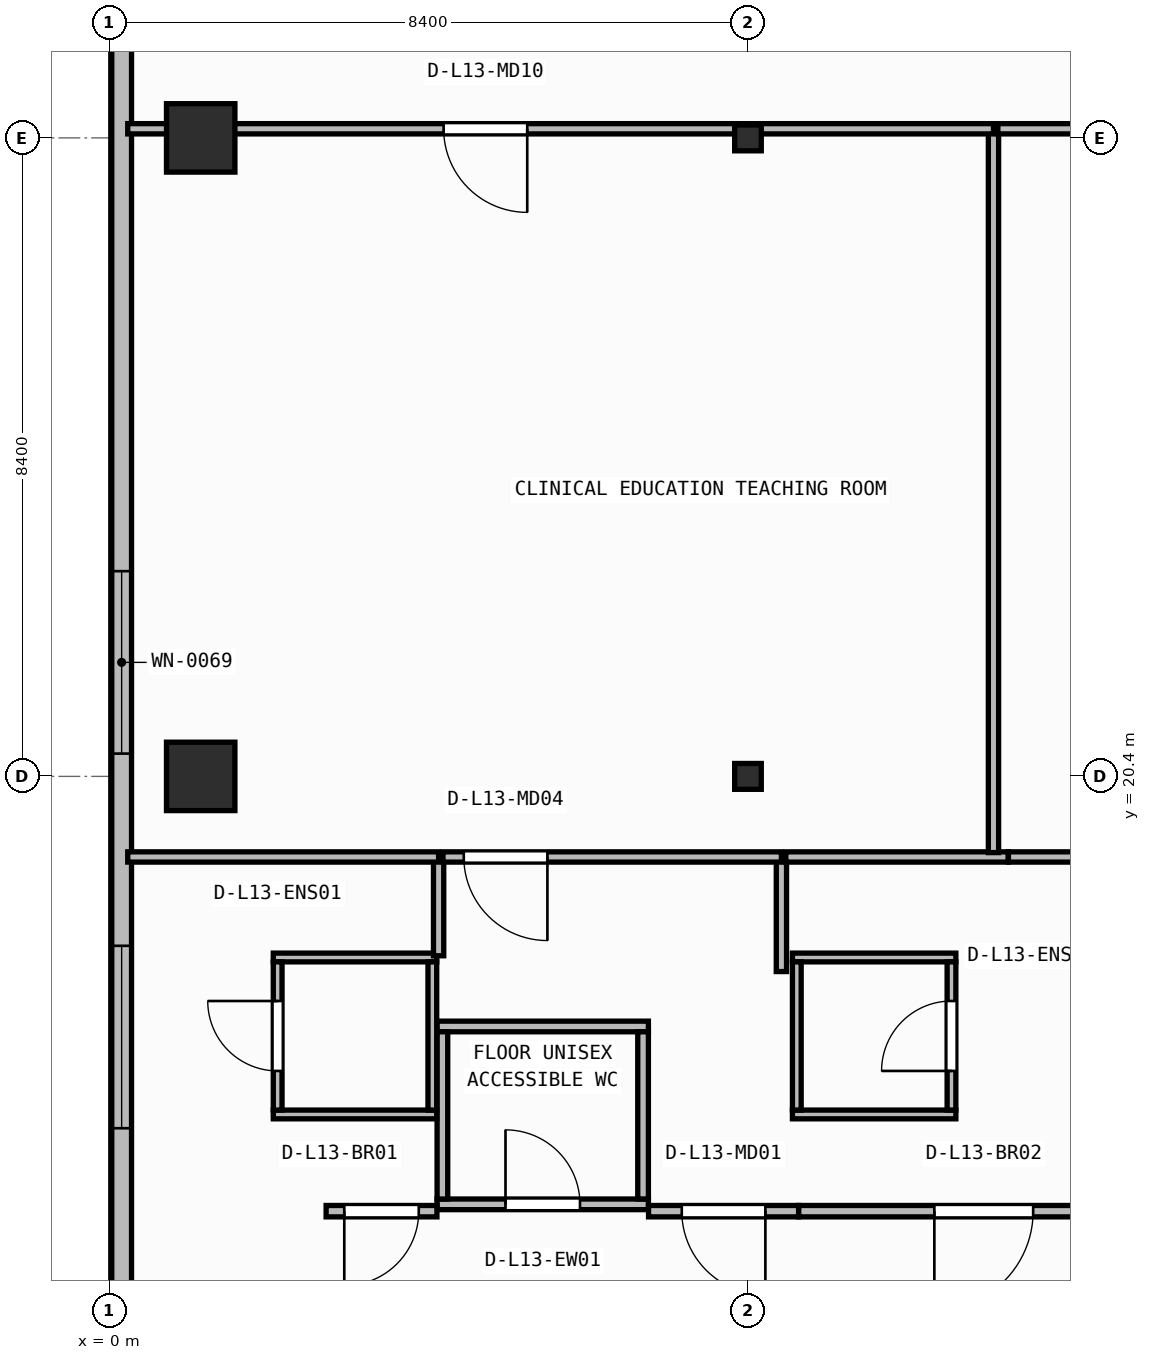
"""IFC4 building model, lengths in metres.
Left out: names, types, materials, properties, quantities, classifications, styles, units other than length and angle.
Written with IfcOpenShell. Run it as: python <this file> out.ifc"""

import sys

from ifc_helpers import new_model, si_unit, direction, frame, frame_2d, origin, origin_2d, place, context, subcontext, project, spatial, rectangle, i_section, extrude, element, fill, save


model = new_model("IFC4")
c1 = context("Model", 3, precision=1e-05, world=origin(), true_north=direction((0.0, 1.0)))
c2 = subcontext(c1, "Body", "Model", "MODEL_VIEW")
j1 = project(units=[si_unit("LENGTHUNIT", "METRE"), si_unit("PLANEANGLEUNIT", "RADIAN")], contexts=[c1])
p1 = place(None, origin())
s1 = spatial("IfcSite", under=j1, at=p1, CompositionType="ELEMENT")
p2 = place(p1, origin())
s2 = spatial("IfcBuilding", under=s1, at=p2, CompositionType="ELEMENT")
p3 = place(p2, frame((0.0, 0.0, 54.1)))
s3 = spatial("IfcBuildingStorey", under=s2, at=p3, CompositionType="ELEMENT", Elevation=54.1)
p4 = place(p3, frame((1.2, 20.4, 0.0), z_axis=(0.0, 0.0, 1.0), x_axis=(1.0, 0.0, 0.0)))
e1 = element("IfcColumn", 1, at=p4, inside=s3, PredefinedType="COLUMN", context=c2, shape_type="SweptSolid", body=[
    extrude(rectangle(XDim=0.9, YDim=0.9, at=origin_2d()), origin(), (0.0, 0.0, 1.0), 3.95),
])
p5 = place(p3, frame((8.4, 20.4, 0.0), z_axis=(0.0, 0.0, 1.0), x_axis=(1.0, 0.0, 0.0)))
e2 = element("IfcColumn", 2, at=p5, inside=s3, PredefinedType="COLUMN", context=c2, shape_type="SweptSolid", body=[
    extrude(i_section(OverallWidth=0.35, OverallDepth=0.34, WebThickness=0.016, FlangeThickness=0.028, at=origin_2d()), origin(), (0.0, 0.0, 1.0), 3.95),
])
p6 = place(p3, frame((1.2, 28.8, 0.0), z_axis=(0.0, 0.0, 1.0), x_axis=(1.0, 0.0, 0.0)))
e3 = element("IfcColumn", 3, at=p6, inside=s3, PredefinedType="COLUMN", context=c2, shape_type="SweptSolid", body=[
    extrude(rectangle(XDim=0.9, YDim=0.9, at=origin_2d()), origin(), (0.0, 0.0, 1.0), 3.95),
])
p7 = place(p3, frame((8.4, 28.8, 0.0), z_axis=(0.0, 0.0, 1.0), x_axis=(1.0, 0.0, 0.0)))
e4 = element("IfcColumn", 4, at=p7, inside=s3, PredefinedType="COLUMN", context=c2, shape_type="SweptSolid", body=[
    extrude(i_section(OverallWidth=0.35, OverallDepth=0.34, WebThickness=0.016, FlangeThickness=0.028, at=origin_2d()), origin(), (0.0, 0.0, 1.0), 3.95),
])
p8 = place(p3, frame((0.16, 41.04, 0.0), z_axis=(0.0, 0.0, 1.0), x_axis=(0.0, -1.0, 0.0)))
e5 = element("IfcWall", 5, at=p8, inside=s3, PredefinedType="STANDARD", context=c2, shape_type="SweptSolid", body=[
    extrude(rectangle(XDim=38.28, YDim=0.26, at=frame_2d((19.14, 0.0))), origin(), (0.0, 0.0, 1.0), 3.71),
])
p9 = place(p8, frame((17.94, 0.0, 0.9)))
e6 = element("IfcOpeningElement", 6, at=p9, cuts=e5, PredefinedType="OPENING", context=c2, shape_type="SweptSolid", body=[
    extrude(rectangle(XDim=2.4, YDim=1.65, at=frame_2d((1.2, 0.825))), frame((0.0, 0.14, 0.0), z_axis=(0.0, -1.0, 0.0), x_axis=(1.0, 0.0, 0.0)), (0.0, 0.0, 1.0), 0.28),
])
p10 = place(p8, frame((22.869, 0.0, 0.9)))
e7 = element("IfcOpeningElement", 7, at=p10, cuts=e5, PredefinedType="OPENING", context=c2, shape_type="SweptSolid", body=[
    extrude(rectangle(XDim=2.4, YDim=1.65, at=frame_2d((1.2, 0.825))), frame((0.0, 0.14, 0.0), z_axis=(0.0, -1.0, 0.0), x_axis=(1.0, 0.0, 0.0)), (0.0, 0.0, 1.0), 0.28),
])
p11 = place(p3, frame((4.31, 14.77, 0.0), z_axis=(0.0, 0.0, 1.0), x_axis=(1.0, 0.0, 0.0)))
e8 = element("IfcWall", 8, at=p11, inside=s3, PredefinedType="PARTITIONING", context=c2, shape_type="SweptSolid", body=[
    extrude(rectangle(XDim=2.78, YDim=0.14, at=frame_2d((1.39, 0.0))), origin(), (0.0, 0.0, 1.0), 3.71),
])
p12 = place(p11, frame((0.9, 0.0, 0.0)))
e9 = element("IfcOpeningElement", 9, at=p12, cuts=e8, PredefinedType="OPENING", context=c2, shape_type="SweptSolid", body=[
    extrude(rectangle(XDim=0.98, YDim=2.1, at=frame_2d((0.49, 1.05))), frame((0.0, 0.08, 0.0), z_axis=(0.0, -1.0, 0.0), x_axis=(1.0, 0.0, 0.0)), (0.0, 0.0, 1.0), 0.16),
])
p13 = place(p3, frame((4.31, 17.11, 0.0), z_axis=(0.0, 0.0, 1.0), x_axis=(1.0, 0.0, 0.0)))
e10 = element("IfcWall", 10, at=p13, inside=s3, PredefinedType="PARTITIONING", context=c2, shape_type="SweptSolid", body=[
    extrude(rectangle(XDim=2.78, YDim=0.14, at=frame_2d((1.39, 0.0))), origin(), (0.0, 0.0, 1.0), 3.71),
])
for number, where, z_axis, x_axis in (
    (11, (4.38, 14.84, 0.0), (0.0, 0.0, 1.0), (0.0, 1.0, 0.0)),
    (12, (7.02, 14.84, 0.0), (0.0, 0.0, 1.0), (0.0, 1.0, 0.0)),
):
    element("IfcWall", number, at=place(p3, frame(where, z_axis=z_axis, x_axis=x_axis)), inside=s3, PredefinedType="PARTITIONING", context=c2, shape_type="SweptSolid", body=[
        extrude(rectangle(XDim=2.2, YDim=0.14, at=frame_2d((1.1, 0.0))), origin(), (0.0, 0.0, 1.0), 3.71),
    ])
for number, where, z_axis, x_axis in (
    (13, (2.155, 15.952, 0.0), (0.0, 0.0, 1.0), (1.0, 0.0, 0.0)),
    (14, (2.155, 18.018, 0.0), (0.0, 0.0, 1.0), (1.0, 0.0, 0.0)),
):
    element("IfcWall", number, at=place(p3, frame(where, z_axis=z_axis, x_axis=x_axis)), inside=s3, PredefinedType="PARTITIONING", context=c2, shape_type="SweptSolid", body=[
        extrude(rectangle(XDim=2.15, YDim=0.115, at=frame_2d((1.075, 0.0))), origin(), (0.0, 0.0, 1.0), 3.71),
    ])
p14 = place(p3, frame((2.212, 16.01, 0.0), z_axis=(0.0, 0.0, 1.0), x_axis=(0.0, 1.0, 0.0)))
e15 = element("IfcWall", 15, at=p14, inside=s3, PredefinedType="PARTITIONING", context=c2, shape_type="SweptSolid", body=[
    extrude(rectangle(XDim=1.95, YDim=0.115, at=frame_2d((0.975, 0.0))), origin(), (0.0, 0.0, 1.0), 3.71),
])
p15 = place(p14, frame((0.515, 0.0, 0.0)))
e16 = element("IfcOpeningElement", 16, at=p15, cuts=e15, PredefinedType="OPENING", context=c2, shape_type="SweptSolid", body=[
    extrude(rectangle(XDim=0.92, YDim=2.1, at=frame_2d((0.46, 1.05))), frame((0.0, 0.067, 0.0), z_axis=(0.0, -1.0, 0.0), x_axis=(1.0, 0.0, 0.0)), (0.0, 0.0, 1.0), 0.135),
])
p16 = place(p3, frame((4.248, 16.01, 0.0), z_axis=(0.0, 0.0, 1.0), x_axis=(0.0, 1.0, 0.0)))
e17 = element("IfcWall", 17, at=p16, inside=s3, PredefinedType="PARTITIONING", context=c2, shape_type="SweptSolid", body=[
    extrude(rectangle(XDim=1.95, YDim=0.115, at=frame_2d((0.975, 0.0))), origin(), (0.0, 0.0, 1.0), 3.71),
])
for number, where, z_axis, x_axis in (
    (18, (8.985, 15.952, 0.0), (0.0, 0.0, 1.0), (1.0, 0.0, 0.0)),
    (19, (8.985, 18.018, 0.0), (0.0, 0.0, 1.0), (1.0, 0.0, 0.0)),
):
    element("IfcWall", number, at=place(p3, frame(where, z_axis=z_axis, x_axis=x_axis)), inside=s3, PredefinedType="PARTITIONING", context=c2, shape_type="SweptSolid", body=[
        extrude(rectangle(XDim=2.15, YDim=0.115, at=frame_2d((1.075, 0.0))), origin(), (0.0, 0.0, 1.0), 3.71),
    ])
p17 = place(p3, frame((9.042, 16.01, 0.0), z_axis=(0.0, 0.0, 1.0), x_axis=(0.0, 1.0, 0.0)))
e20 = element("IfcWall", 20, at=p17, inside=s3, PredefinedType="PARTITIONING", context=c2, shape_type="SweptSolid", body=[
    extrude(rectangle(XDim=1.95, YDim=0.115, at=frame_2d((0.975, 0.0))), origin(), (0.0, 0.0, 1.0), 3.71),
])
p18 = place(p3, frame((11.077, 16.01, 0.0), z_axis=(0.0, 0.0, 1.0), x_axis=(0.0, 1.0, 0.0)))
e21 = element("IfcWall", 21, at=p18, inside=s3, PredefinedType="PARTITIONING", context=c2, shape_type="SweptSolid", body=[
    extrude(rectangle(XDim=1.95, YDim=0.115, at=frame_2d((0.975, 0.0))), origin(), (0.0, 0.0, 1.0), 3.71),
])
p19 = place(p18, frame((0.515, 0.0, 0.0)))
e22 = element("IfcOpeningElement", 22, at=p19, cuts=e21, PredefinedType="OPENING", context=c2, shape_type="SweptSolid", body=[
    extrude(rectangle(XDim=0.92, YDim=2.1, at=frame_2d((0.46, 1.05))), frame((0.0, 0.067, 0.0), z_axis=(0.0, -1.0, 0.0), x_axis=(1.0, 0.0, 0.0)), (0.0, 0.0, 1.0), 0.135),
])
p20 = place(p3, frame((4.308, 14.68, 0.0), z_axis=(0.0, 0.0, 1.0), x_axis=(-1.0, 0.0, 0.0)))
e23 = element("IfcWall", 23, at=p20, inside=s3, PredefinedType="PARTITIONING", context=c2, shape_type="SweptSolid", body=[
    extrude(rectangle(XDim=1.458, YDim=0.15, at=frame_2d((0.729, 0.0))), origin(), (0.0, 0.0, 1.0), 3.71),
])
p21 = place(p20, frame((0.239, 0.0, 0.0)))
e24 = element("IfcOpeningElement", 24, at=p21, cuts=e23, PredefinedType="OPENING", context=c2, shape_type="SweptSolid", body=[
    extrude(rectangle(XDim=0.98, YDim=2.1, at=frame_2d((0.49, 1.05))), frame((0.0, 0.085, 0.0), z_axis=(0.0, -1.0, 0.0), x_axis=(1.0, 0.0, 0.0)), (0.0, 0.0, 1.0), 0.17),
])
p22 = place(p3, frame((9.066, 14.68, 0.0), z_axis=(0.0, 0.0, 1.0), x_axis=(-1.0, 0.0, 0.0)))
e25 = element("IfcWall", 25, at=p22, inside=s3, PredefinedType="PARTITIONING", context=c2, shape_type="SweptSolid", body=[
    extrude(rectangle(XDim=1.974, YDim=0.15, at=frame_2d((0.987, 0.0))), origin(), (0.0, 0.0, 1.0), 3.71),
])
p23 = place(p22, frame((0.437, 0.0, 0.0)))
e26 = element("IfcOpeningElement", 26, at=p23, cuts=e25, PredefinedType="OPENING", context=c2, shape_type="SweptSolid", body=[
    extrude(rectangle(XDim=1.1, YDim=2.1, at=frame_2d((0.55, 1.05))), frame((0.0, 0.085, 0.0), z_axis=(0.0, -1.0, 0.0), x_axis=(1.0, 0.0, 0.0)), (0.0, 0.0, 1.0), 0.17),
])
p24 = place(p3, frame((13.936, 14.68, 0.0), z_axis=(0.0, 0.0, 1.0), x_axis=(-1.0, 0.0, 0.0)))
e27 = element("IfcWall", 27, at=p24, inside=s3, PredefinedType="PARTITIONING", context=c2, shape_type="SweptSolid", body=[
    extrude(rectangle(XDim=4.868, YDim=0.15, at=frame_2d((2.434, 0.0))), origin(), (0.0, 0.0, 1.0), 3.71),
])
p25 = place(p24, frame((1.784, 0.0, 0.0)))
e28 = element("IfcOpeningElement", 28, at=p25, cuts=e27, PredefinedType="OPENING", context=c2, shape_type="SweptSolid", body=[
    extrude(rectangle(XDim=1.3, YDim=2.15, at=frame_2d((0.65, 1.075))), frame((0.0, 0.085, 0.0), z_axis=(0.0, -1.0, 0.0), x_axis=(1.0, 0.0, 0.0)), (0.0, 0.0, 1.0), 0.17),
])
p26 = place(p3, frame((4.33, 18.04, 0.0), z_axis=(0.0, 0.0, 1.0), x_axis=(0.0, 1.0, 0.0)))
e29 = element("IfcWall", 29, at=p26, inside=s3, PredefinedType="PARTITIONING", context=c2, shape_type="SweptSolid", body=[
    extrude(rectangle(XDim=1.3, YDim=0.135, at=frame_2d((0.65, 0.0))), origin(), (0.0, 0.0, 1.0), 3.71),
])
p27 = place(p3, frame((4.33, 19.34, 0.0), z_axis=(0.0, 0.0, 1.0), x_axis=(-1.0, 0.0, 0.0)))
e30 = element("IfcWall", 30, at=p27, inside=s3, PredefinedType="PARTITIONING", context=c2, shape_type="SweptSolid", body=[
    extrude(rectangle(XDim=4.09, YDim=0.135, at=frame_2d((2.045, 0.0))), origin(), (0.0, 0.0, 1.0), 3.71),
])
p28 = place(p3, frame((8.84, 17.833, 0.0), z_axis=(0.0, 0.0, 1.0), x_axis=(0.0, 1.0, 0.0)))
e31 = element("IfcWall", 31, at=p28, inside=s3, PredefinedType="PARTITIONING", context=c2, shape_type="SweptSolid", body=[
    extrude(rectangle(XDim=1.508, YDim=0.135, at=frame_2d((0.754, 0.0))), origin(), (0.0, 0.0, 1.0), 3.71),
])
p29 = place(p3, frame((8.84, 19.34, 0.0), z_axis=(0.0, 0.0, 1.0), x_axis=(-1.0, 0.0, 0.0)))
e32 = element("IfcWall", 32, at=p29, inside=s3, PredefinedType="PARTITIONING", context=c2, shape_type="SweptSolid", body=[
    extrude(rectangle(XDim=4.453, YDim=0.135, at=frame_2d((2.226, 0.0))), origin(), (0.0, 0.0, 1.0), 3.71),
])
p30 = place(p29, frame((3.079, 0.0, 0.0)))
e33 = element("IfcOpeningElement", 33, at=p30, cuts=e32, PredefinedType="OPENING", context=c2, shape_type="SweptSolid", body=[
    extrude(rectangle(XDim=1.1, YDim=2.1, at=frame_2d((0.55, 1.05))), frame((0.0, 0.077, 0.0), z_axis=(0.0, -1.0, 0.0), x_axis=(1.0, 0.0, 0.0)), (0.0, 0.0, 1.0), 0.155),
])
p31 = place(p3, frame((11.825, 19.34, 0.0), z_axis=(0.0, 0.0, 1.0), x_axis=(-1.0, 0.0, 0.0)))
e34 = element("IfcWall", 34, at=p31, inside=s3, PredefinedType="PARTITIONING", context=c2, shape_type="SweptSolid", body=[
    extrude(rectangle(XDim=2.927, YDim=0.135, at=frame_2d((1.464, 0.0))), origin(), (0.0, 0.0, 1.0), 3.71),
])
p32 = place(p3, frame((13.71, 19.34, 0.0), z_axis=(0.0, 0.0, 1.0), x_axis=(-1.0, 0.0, 0.0)))
e35 = element("IfcWall", 35, at=p32, inside=s3, PredefinedType="PARTITIONING", context=c2, shape_type="SweptSolid", body=[
    extrude(rectangle(XDim=1.883, YDim=0.135, at=frame_2d((0.942, 0.0))), origin(), (0.0, 0.0, 1.0), 3.71),
])
p33 = place(p3, frame((11.63, 19.397, 0.0), z_axis=(0.0, 0.0, 1.0), x_axis=(0.0, 1.0, 0.0)))
e36 = element("IfcWall", 36, at=p33, inside=s3, PredefinedType="PARTITIONING", context=c2, shape_type="SweptSolid", body=[
    extrude(rectangle(XDim=9.522, YDim=0.135, at=frame_2d((4.761, 0.0))), origin(), (0.0, 0.0, 1.0), 3.71),
])
p34 = place(p3, frame((11.63, 28.92, 0.0), z_axis=(0.0, 0.0, 1.0), x_axis=(-1.0, 0.0, 0.0)))
e37 = element("IfcWall", 37, at=p34, inside=s3, PredefinedType="PARTITIONING", context=c2, shape_type="SweptSolid", body=[
    extrude(rectangle(XDim=11.39, YDim=0.135, at=frame_2d((5.695, 0.0))), origin(), (0.0, 0.0, 1.0), 3.073),
])
p35 = place(p34, frame((6.134, 0.0, 0.0)))
e38 = element("IfcOpeningElement", 38, at=p35, cuts=e37, PredefinedType="OPENING", context=c2, shape_type="SweptSolid", body=[
    extrude(rectangle(XDim=1.1, YDim=2.1, at=frame_2d((0.55, 1.05))), frame((0.0, 0.077, 0.0), z_axis=(0.0, -1.0, 0.0), x_axis=(1.0, 0.0, 0.0)), (0.0, 0.0, 1.0), 0.155),
])
p36 = place(p3, frame((14.565, 28.92, 0.0), z_axis=(0.0, 0.0, 1.0), x_axis=(-1.0, 0.0, 0.0)))
e39 = element("IfcWall", 39, at=p36, inside=s3, PredefinedType="PARTITIONING", context=c2, shape_type="SweptSolid", body=[
    extrude(rectangle(XDim=2.877, YDim=0.135, at=frame_2d((1.438, 0.0))), origin(), (0.0, 0.0, 1.0), 3.073),
])
p37 = place(p9, origin())
e40 = element("IfcWindow", 40, at=p37, inside=s3, PartitioningType="SINGLE_PANEL", PredefinedType="WINDOW", context=c2, shape_type="SweptSolid", body=[
    extrude(rectangle(XDim=2.4, YDim=1.65, at=frame_2d((1.2, 0.825))), frame((0.0, 0.03, 0.0), z_axis=(0.0, -1.0, 0.0), x_axis=(1.0, 0.0, 0.0)), (0.0, 0.0, 1.0), 0.06),
])
fill(e6, e40)
p38 = place(p12, origin())
e41 = element("IfcDoor", 41, at=p38, inside=s3, OperationType="SINGLE_SWING_LEFT", PredefinedType="DOOR", context=c2, shape_type="SweptSolid", body=[
    extrude(rectangle(XDim=0.98, YDim=2.1, at=frame_2d((0.49, 1.05))), frame((0.0, 0.025, 0.0), z_axis=(0.0, -1.0, 0.0), x_axis=(1.0, 0.0, 0.0)), (0.0, 0.0, 1.0), 0.05),
])
fill(e9, e41)
p39 = place(p15, origin())
e42 = element("IfcDoor", 42, at=p39, inside=s3, OperationType="SINGLE_SWING_RIGHT", PredefinedType="DOOR", context=c2, shape_type="SweptSolid", body=[
    extrude(rectangle(XDim=0.92, YDim=2.1, at=frame_2d((0.46, 1.05))), frame((0.0, 0.025, 0.0), z_axis=(0.0, -1.0, 0.0), x_axis=(1.0, 0.0, 0.0)), (0.0, 0.0, 1.0), 0.05),
])
fill(e16, e42)
p40 = place(p19, origin())
e43 = element("IfcDoor", 43, at=p40, inside=s3, OperationType="SINGLE_SWING_LEFT", PredefinedType="DOOR", context=c2, shape_type="SweptSolid", body=[
    extrude(rectangle(XDim=0.92, YDim=2.1, at=frame_2d((0.46, 1.05))), frame((0.0, 0.025, 0.0), z_axis=(0.0, -1.0, 0.0), x_axis=(1.0, 0.0, 0.0)), (0.0, 0.0, 1.0), 0.05),
])
fill(e22, e43)
p41 = place(p21, origin())
e44 = element("IfcDoor", 44, at=p41, inside=s3, OperationType="SINGLE_SWING_RIGHT", PredefinedType="DOOR", context=c2, shape_type="SweptSolid", body=[
    extrude(rectangle(XDim=0.98, YDim=2.1, at=frame_2d((0.49, 1.05))), frame((0.0, 0.025, 0.0), z_axis=(0.0, -1.0, 0.0), x_axis=(1.0, 0.0, 0.0)), (0.0, 0.0, 1.0), 0.05),
])
fill(e24, e44)
p42 = place(p23, origin())
e45 = element("IfcDoor", 45, at=p42, inside=s3, OperationType="SINGLE_SWING_LEFT", PredefinedType="DOOR", context=c2, shape_type="SweptSolid", body=[
    extrude(rectangle(XDim=1.1, YDim=2.1, at=frame_2d((0.55, 1.05))), frame((0.0, 0.025, 0.0), z_axis=(0.0, -1.0, 0.0), x_axis=(1.0, 0.0, 0.0)), (0.0, 0.0, 1.0), 0.05),
])
fill(e26, e45)
p43 = place(p25, origin())
e46 = element("IfcDoor", 46, at=p43, inside=s3, OperationType="SINGLE_SWING_RIGHT", PredefinedType="DOOR", context=c2, shape_type="SweptSolid", body=[
    extrude(rectangle(XDim=1.3, YDim=2.15, at=frame_2d((0.65, 1.075))), frame((0.0, 0.025, 0.0), z_axis=(0.0, -1.0, 0.0), x_axis=(1.0, 0.0, 0.0)), (0.0, 0.0, 1.0), 0.05),
])
fill(e28, e46)
p44 = place(p30, origin())
e47 = element("IfcDoor", 47, at=p44, inside=s3, OperationType="SINGLE_SWING_LEFT", PredefinedType="DOOR", context=c2, shape_type="SweptSolid", body=[
    extrude(rectangle(XDim=1.1, YDim=2.1, at=frame_2d((0.55, 1.05))), frame((0.0, 0.025, 0.0), z_axis=(0.0, -1.0, 0.0), x_axis=(1.0, 0.0, 0.0)), (0.0, 0.0, 1.0), 0.05),
])
fill(e33, e47)
p45 = place(p35, origin())
e48 = element("IfcDoor", 48, at=p45, inside=s3, OperationType="SINGLE_SWING_LEFT", PredefinedType="DOOR", context=c2, shape_type="SweptSolid", body=[
    extrude(rectangle(XDim=1.1, YDim=2.1, at=frame_2d((0.55, 1.05))), frame((0.0, 0.025, 0.0), z_axis=(0.0, -1.0, 0.0), x_axis=(1.0, 0.0, 0.0)), (0.0, 0.0, 1.0), 0.05),
])
fill(e38, e48)
p46 = place(p10, origin())
e49 = element("IfcWindow", 49, at=p46, inside=s3, PartitioningType="SINGLE_PANEL", PredefinedType="WINDOW", context=c2, shape_type="SweptSolid", body=[
    extrude(rectangle(XDim=2.4, YDim=1.65, at=frame_2d((1.2, 0.825))), frame((0.0, 0.03, 0.0), z_axis=(0.0, -1.0, 0.0), x_axis=(1.0, 0.0, 0.0)), (0.0, 0.0, 1.0), 0.06),
])
fill(e7, e49)
save(model, sys.argv[1])
